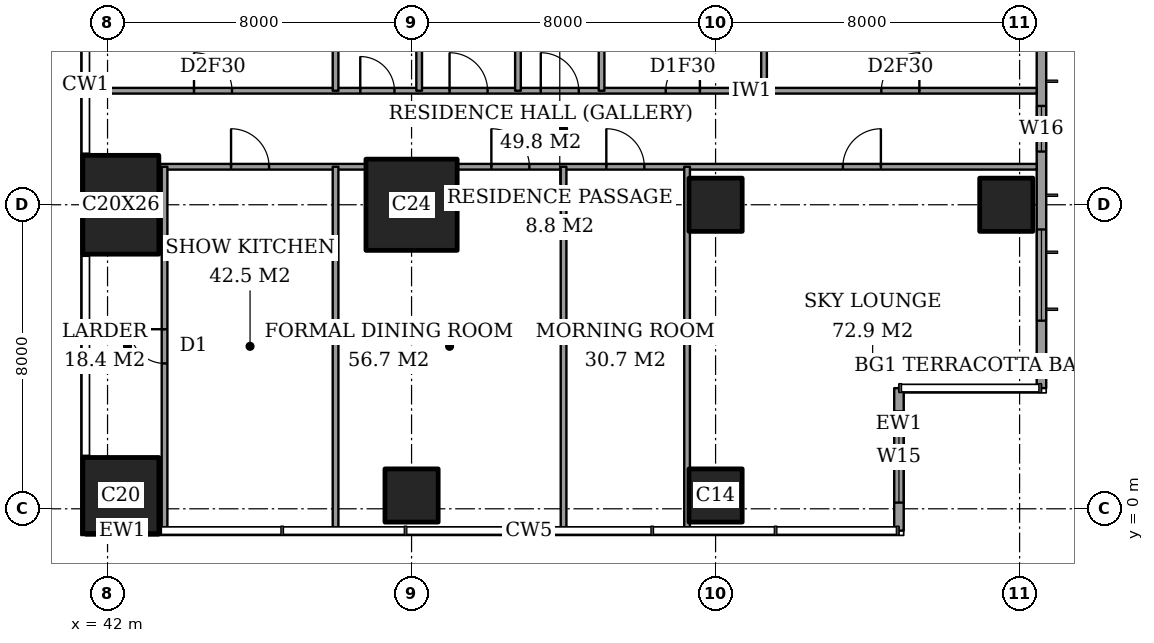
"""IFC4 building model, lengths in metres.
Left out: names, types, materials, properties, quantities, classifications, styles, units other than length and angle.
Written with IfcOpenShell. Run it as: python <this file> out.ifc"""

import sys

from ifc_helpers import new_model, si_unit, direction, frame, frame_2d, origin, origin_2d, place, context, subcontext, project, spatial, rectangle, extrude, element, fill, save


model = new_model("IFC4")
c1 = context("Model", 3, precision=1e-05, world=origin(), true_north=direction((0.0, 1.0)))
c2 = subcontext(c1, "Body", "Model", "MODEL_VIEW")
j1 = project(units=[si_unit("LENGTHUNIT", "METRE"), si_unit("PLANEANGLEUNIT", "RADIAN")], contexts=[c1])
p1 = place(None, origin())
s1 = spatial("IfcSite", under=j1, at=p1, CompositionType="ELEMENT")
p2 = place(p1, origin())
s2 = spatial("IfcBuilding", under=s1, at=p2, CompositionType="ELEMENT")
p3 = place(p2, frame((0.0, 0.0, 282.6)))
s3 = spatial("IfcBuildingStorey", under=s2, at=p3, CompositionType="ELEMENT", Elevation=282.6)
p4 = place(p3, frame((42.35, 0.35, 0.0), z_axis=(0.0, 0.0, 1.0), x_axis=(1.0, 0.0, 0.0)))
e1 = element("IfcColumn", 1, at=p4, inside=s3, PredefinedType="COLUMN", context=c2, shape_type="SweptSolid", body=[
    extrude(rectangle(XDim=2.0, YDim=2.0, at=origin_2d()), origin(), (0.0, 0.0, 1.0), 4.5),
])
p5 = place(p3, frame((42.35, 8.0, 0.0), z_axis=(0.0, 0.0, 1.0), x_axis=(1.0, 0.0, 0.0)))
e2 = element("IfcColumn", 2, at=p5, inside=s3, PredefinedType="COLUMN", context=c2, shape_type="SweptSolid", body=[
    extrude(rectangle(XDim=2.0, YDim=2.6, at=origin_2d()), origin(), (0.0, 0.0, 1.0), 4.5),
])
p6 = place(p3, frame((50.0, 0.35, 0.0), z_axis=(0.0, 0.0, 1.0), x_axis=(1.0, 0.0, 0.0)))
e3 = element("IfcColumn", 3, at=p6, inside=s3, PredefinedType="COLUMN", context=c2, shape_type="SweptSolid", body=[
    extrude(rectangle(XDim=1.4, YDim=1.4, at=origin_2d()), origin(), (0.0, 0.0, 1.0), 4.5),
])
p7 = place(p3, frame((50.0, 8.0, 0.0), z_axis=(0.0, 0.0, 1.0), x_axis=(1.0, 0.0, 0.0)))
e4 = element("IfcColumn", 4, at=p7, inside=s3, PredefinedType="COLUMN", context=c2, shape_type="SweptSolid", body=[
    extrude(rectangle(XDim=2.4, YDim=2.4, at=origin_2d()), origin(), (0.0, 0.0, 1.0), 4.5),
])
for number, where, z_axis, x_axis in (
    (5, (58.0, 0.35, 0.0), (0.0, 0.0, 1.0), (1.0, 0.0, 0.0)),
    (6, (58.0, 8.0, 0.0), (0.0, 0.0, 1.0), (1.0, 0.0, 0.0)),
    (7, (65.65, 8.0, 0.0), (0.0, 0.0, 1.0), (1.0, 0.0, 0.0)),
):
    element("IfcColumn", number, at=place(p3, frame(where, z_axis=z_axis, x_axis=x_axis)), inside=s3, PredefinedType="COLUMN", context=c2, shape_type="SweptSolid", body=[
        extrude(rectangle(XDim=1.4, YDim=1.4, at=origin_2d()), origin(), (0.0, 0.0, 1.0), 4.5),
    ])
p8 = place(p3, frame((41.425, -0.575, 0.0), z_axis=(0.0, 0.0, 1.0), x_axis=(1.0, 0.0, 0.0)))
e8 = element("IfcWall", 8, at=p8, inside=s3, PredefinedType="SOLIDWALL", context=c2, shape_type="SweptSolid", body=[
    extrude(rectangle(XDim=1.925, YDim=0.25, at=frame_2d((0.962, 0.0))), origin(), (0.0, 0.0, 1.0), 4.5),
])
p9 = place(p3, frame((62.825, -0.575, 0.0), z_axis=(0.0, 0.0, 1.0), x_axis=(0.0, 1.0, 0.0)))
e9 = element("IfcWall", 9, at=p9, inside=s3, PredefinedType="SOLIDWALL", context=c2, shape_type="SweptSolid", body=[
    extrude(rectangle(XDim=3.75, YDim=0.25, at=frame_2d((1.875, 0.0))), origin(), (0.0, 0.0, 1.0), 4.5),
])
p10 = place(p9, frame((0.738, 0.0, 0.6)))
e10 = element("IfcOpeningElement", 10, at=p10, cuts=e9, PredefinedType="OPENING", context=c2, shape_type="SweptSolid", body=[
    extrude(rectangle(XDim=2.4, YDim=2.8, at=frame_2d((1.2, 1.4))), frame((0.0, 0.135, 0.0), z_axis=(0.0, -1.0, 0.0), x_axis=(1.0, 0.0, 0.0)), (0.0, 0.0, 1.0), 0.27),
])
p11 = place(p3, frame((66.575, 3.175, 0.0), z_axis=(0.0, 0.0, 1.0), x_axis=(0.0, 1.0, 0.0)))
e11 = element("IfcWall", 11, at=p11, inside=s3, PredefinedType="SOLIDWALL", context=c2, shape_type="SweptSolid", body=[
    extrude(rectangle(XDim=41.65, YDim=0.25, at=frame_2d((20.825, 0.0))), origin(), (0.0, 0.0, 1.0), 4.5),
])
p12 = place(p11, frame((1.775, 0.0, 0.6)))
e12 = element("IfcOpeningElement", 12, at=p12, cuts=e11, PredefinedType="OPENING", context=c2, shape_type="SweptSolid", body=[
    extrude(rectangle(XDim=2.4, YDim=2.8, at=frame_2d((1.2, 1.4))), frame((0.0, 0.135, 0.0), z_axis=(0.0, -1.0, 0.0), x_axis=(1.0, 0.0, 0.0)), (0.0, 0.0, 1.0), 0.27),
])
p13 = place(p11, frame((6.225, 0.0, 0.6)))
e13 = element("IfcOpeningElement", 13, at=p13, cuts=e11, PredefinedType="OPENING", context=c2, shape_type="SweptSolid", body=[
    extrude(rectangle(XDim=1.2, YDim=2.8, at=frame_2d((0.6, 1.4))), frame((0.0, 0.135, 0.0), z_axis=(0.0, -1.0, 0.0), x_axis=(1.0, 0.0, 0.0)), (0.0, 0.0, 1.0), 0.27),
])
p14 = place(p11, frame((9.625, 0.0, 0.6)))
e14 = element("IfcOpeningElement", 14, at=p14, cuts=e11, PredefinedType="OPENING", context=c2, shape_type="SweptSolid", body=[
    extrude(rectangle(XDim=2.4, YDim=2.8, at=frame_2d((1.2, 1.4))), frame((0.0, 0.135, 0.0), z_axis=(0.0, -1.0, 0.0), x_axis=(1.0, 0.0, 0.0)), (0.0, 0.0, 1.0), 0.27),
])
p15 = place(p11, frame((14.525, 0.0, 0.6)))
e15 = element("IfcOpeningElement", 15, at=p15, cuts=e11, PredefinedType="OPENING", context=c2, shape_type="SweptSolid", body=[
    extrude(rectangle(XDim=2.4, YDim=2.8, at=frame_2d((1.2, 1.4))), frame((0.0, 0.135, 0.0), z_axis=(0.0, -1.0, 0.0), x_axis=(1.0, 0.0, 0.0)), (0.0, 0.0, 1.0), 0.27),
])
p16 = place(p11, frame((17.725, 0.0, 0.6)))
e16 = element("IfcOpeningElement", 16, at=p16, cuts=e11, PredefinedType="OPENING", context=c2, shape_type="SweptSolid", body=[
    extrude(rectangle(XDim=2.4, YDim=2.8, at=frame_2d((1.2, 1.4))), frame((0.0, 0.135, 0.0), z_axis=(0.0, -1.0, 0.0), x_axis=(1.0, 0.0, 0.0)), (0.0, 0.0, 1.0), 0.27),
])
p17 = place(p11, frame((21.525, 0.0, 0.6)))
e17 = element("IfcOpeningElement", 17, at=p17, cuts=e11, PredefinedType="OPENING", context=c2, shape_type="SweptSolid", body=[
    extrude(rectangle(XDim=2.4, YDim=2.8, at=frame_2d((1.2, 1.4))), frame((0.0, 0.135, 0.0), z_axis=(0.0, -1.0, 0.0), x_axis=(1.0, 0.0, 0.0)), (0.0, 0.0, 1.0), 0.27),
])
p18 = place(p11, frame((24.725, 0.0, 0.6)))
e18 = element("IfcOpeningElement", 18, at=p18, cuts=e11, PredefinedType="OPENING", context=c2, shape_type="SweptSolid", body=[
    extrude(rectangle(XDim=2.4, YDim=2.8, at=frame_2d((1.2, 1.4))), frame((0.0, 0.135, 0.0), z_axis=(0.0, -1.0, 0.0), x_axis=(1.0, 0.0, 0.0)), (0.0, 0.0, 1.0), 0.27),
])
p19 = place(p11, frame((29.725, 0.0, 0.6)))
e19 = element("IfcOpeningElement", 19, at=p19, cuts=e11, PredefinedType="OPENING", context=c2, shape_type="SweptSolid", body=[
    extrude(rectangle(XDim=2.4, YDim=2.8, at=frame_2d((1.2, 1.4))), frame((0.0, 0.135, 0.0), z_axis=(0.0, -1.0, 0.0), x_axis=(1.0, 0.0, 0.0)), (0.0, 0.0, 1.0), 0.27),
])
p20 = place(p11, frame((34.325, 0.0, 0.6)))
e20 = element("IfcOpeningElement", 20, at=p20, cuts=e11, PredefinedType="OPENING", context=c2, shape_type="SweptSolid", body=[
    extrude(rectangle(XDim=1.2, YDim=2.8, at=frame_2d((0.6, 1.4))), frame((0.0, 0.135, 0.0), z_axis=(0.0, -1.0, 0.0), x_axis=(1.0, 0.0, 0.0)), (0.0, 0.0, 1.0), 0.27),
])
p21 = place(p11, frame((37.475, 0.0, 0.6)))
e21 = element("IfcOpeningElement", 21, at=p21, cuts=e11, PredefinedType="OPENING", context=c2, shape_type="SweptSolid", body=[
    extrude(rectangle(XDim=2.4, YDim=2.8, at=frame_2d((1.2, 1.4))), frame((0.0, 0.135, 0.0), z_axis=(0.0, -1.0, 0.0), x_axis=(1.0, 0.0, 0.0)), (0.0, 0.0, 1.0), 0.27),
])
p22 = place(p3, frame((43.35, 9.0, 0.0), z_axis=(0.0, 0.0, 1.0), x_axis=(1.0, 0.0, 0.0)))
e22 = element("IfcWall", 22, at=p22, inside=s3, PredefinedType="PARTITIONING", context=c2, shape_type="SweptSolid", body=[
    extrude(rectangle(XDim=5.45, YDim=0.15, at=frame_2d((2.725, 0.0))), origin(), (0.0, 0.0, 1.0), 4.25),
])
p23 = place(p22, frame((1.9, 0.0, 0.0)))
e23 = element("IfcOpeningElement", 23, at=p23, cuts=e22, PredefinedType="OPENING", context=c2, shape_type="SweptSolid", body=[
    extrude(rectangle(XDim=1.0, YDim=2.1, at=frame_2d((0.5, 1.05))), frame((0.0, 0.085, 0.0), z_axis=(0.0, -1.0, 0.0), x_axis=(1.0, 0.0, 0.0)), (0.0, 0.0, 1.0), 0.17),
])
p24 = place(p3, frame((51.2, 9.0, 0.0), z_axis=(0.0, 0.0, 1.0), x_axis=(1.0, 0.0, 0.0)))
e24 = element("IfcWall", 24, at=p24, inside=s3, PredefinedType="PARTITIONING", context=c2, shape_type="SweptSolid", body=[
    extrude(rectangle(XDim=15.25, YDim=0.15, at=frame_2d((7.625, 0.0))), origin(), (0.0, 0.0, 1.0), 4.25),
])
p25 = place(p24, frame((10.15, 0.0, 0.0)))
e25 = element("IfcOpeningElement", 25, at=p25, cuts=e24, PredefinedType="OPENING", context=c2, shape_type="SweptSolid", body=[
    extrude(rectangle(XDim=1.0, YDim=2.1, at=frame_2d((0.5, 1.05))), frame((0.0, 0.085, 0.0), z_axis=(0.0, -1.0, 0.0), x_axis=(1.0, 0.0, 0.0)), (0.0, 0.0, 1.0), 0.17),
])
p26 = place(p24, frame((3.925, 0.0, 0.0)))
e26 = element("IfcOpeningElement", 26, at=p26, cuts=e24, PredefinedType="OPENING", context=c2, shape_type="SweptSolid", body=[
    extrude(rectangle(XDim=1.0, YDim=2.1, at=frame_2d((0.5, 1.05))), frame((0.0, 0.085, 0.0), z_axis=(0.0, -1.0, 0.0), x_axis=(1.0, 0.0, 0.0)), (0.0, 0.0, 1.0), 0.17),
])
p27 = place(p24, frame((0.9, 0.0, 0.0)))
e27 = element("IfcOpeningElement", 27, at=p27, cuts=e24, PredefinedType="OPENING", context=c2, shape_type="SweptSolid", body=[
    extrude(rectangle(XDim=1.0, YDim=2.1, at=frame_2d((0.5, 1.05))), frame((0.0, 0.085, 0.0), z_axis=(0.0, -1.0, 0.0), x_axis=(1.0, 0.0, 0.0)), (0.0, 0.0, 1.0), 0.17),
])
p28 = place(p3, frame((41.439, 11.0, 0.0), z_axis=(0.0, 0.0, 1.0), x_axis=(1.0, 0.0, 0.0)))
e28 = element("IfcWall", 28, at=p28, inside=s3, PredefinedType="PARTITIONING", context=c2, shape_type="SweptSolid", body=[
    extrude(rectangle(XDim=25.011, YDim=0.15, at=frame_2d((12.505, 0.0))), origin(), (0.0, 0.0, 1.0), 4.25),
])
p29 = place(p28, frame((11.961, 0.0, 0.0)))
e29 = element("IfcOpeningElement", 29, at=p29, cuts=e28, PredefinedType="OPENING", context=c2, shape_type="SweptSolid", body=[
    extrude(rectangle(XDim=1.0, YDim=2.1, at=frame_2d((0.5, 1.05))), frame((0.0, 0.085, 0.0), z_axis=(0.0, -1.0, 0.0), x_axis=(1.0, 0.0, 0.0)), (0.0, 0.0, 1.0), 0.17),
])
p30 = place(p28, frame((20.924, 0.0, 0.0)))
e30 = element("IfcOpeningElement", 30, at=p30, cuts=e28, PredefinedType="OPENING", context=c2, shape_type="SweptSolid", body=[
    extrude(rectangle(XDim=1.0, YDim=2.1, at=frame_2d((0.5, 1.05))), frame((0.0, 0.085, 0.0), z_axis=(0.0, -1.0, 0.0), x_axis=(1.0, 0.0, 0.0)), (0.0, 0.0, 1.0), 0.17),
])
p31 = place(p28, frame((15.249, 0.0, 0.0)))
e31 = element("IfcOpeningElement", 31, at=p31, cuts=e28, PredefinedType="OPENING", context=c2, shape_type="SweptSolid", body=[
    extrude(rectangle(XDim=0.9, YDim=2.1, at=frame_2d((0.45, 1.05))), frame((0.0, 0.085, 0.0), z_axis=(0.0, -1.0, 0.0), x_axis=(1.0, 0.0, 0.0)), (0.0, 0.0, 1.0), 0.17),
])
p32 = place(p28, frame((9.561, 0.0, 0.0)))
e32 = element("IfcOpeningElement", 32, at=p32, cuts=e28, PredefinedType="OPENING", context=c2, shape_type="SweptSolid", body=[
    extrude(rectangle(XDim=1.0, YDim=2.1, at=frame_2d((0.5, 1.05))), frame((0.0, 0.085, 0.0), z_axis=(0.0, -1.0, 0.0), x_axis=(1.0, 0.0, 0.0)), (0.0, 0.0, 1.0), 0.17),
])
p33 = place(p28, frame((7.211, 0.0, 0.0)))
e33 = element("IfcOpeningElement", 33, at=p33, cuts=e28, PredefinedType="OPENING", context=c2, shape_type="SweptSolid", body=[
    extrude(rectangle(XDim=0.9, YDim=2.1, at=frame_2d((0.45, 1.05))), frame((0.0, 0.085, 0.0), z_axis=(0.0, -1.0, 0.0), x_axis=(1.0, 0.0, 0.0)), (0.0, 0.0, 1.0), 0.17),
])
p34 = place(p28, frame((2.836, 0.0, 0.0)))
e34 = element("IfcOpeningElement", 34, at=p34, cuts=e28, PredefinedType="OPENING", context=c2, shape_type="SweptSolid", body=[
    extrude(rectangle(XDim=1.0, YDim=2.1, at=frame_2d((0.5, 1.05))), frame((0.0, 0.085, 0.0), z_axis=(0.0, -1.0, 0.0), x_axis=(1.0, 0.0, 0.0)), (0.0, 0.0, 1.0), 0.17),
])
p35 = place(p3, frame((43.5, -0.561, 0.0), z_axis=(0.0, 0.0, 1.0), x_axis=(0.0, 1.0, 0.0)))
e35 = element("IfcWall", 35, at=p35, inside=s3, PredefinedType="PARTITIONING", context=c2, shape_type="SweptSolid", body=[
    extrude(rectangle(XDim=9.561, YDim=0.15, at=frame_2d((4.781, 0.0))), origin(), (0.0, 0.0, 1.0), 4.25),
])
p36 = place(p35, frame((4.386, 0.0, 0.0)))
e36 = element("IfcOpeningElement", 36, at=p36, cuts=e35, PredefinedType="OPENING", context=c2, shape_type="SweptSolid", body=[
    extrude(rectangle(XDim=0.9, YDim=2.1, at=frame_2d((0.45, 1.05))), frame((0.0, 0.085, 0.0), z_axis=(0.0, -1.0, 0.0), x_axis=(1.0, 0.0, 0.0)), (0.0, 0.0, 1.0), 0.17),
])
p37 = place(p3, frame((48.0, -0.561, 0.0), z_axis=(0.0, 0.0, 1.0), x_axis=(0.0, 1.0, 0.0)))
e37 = element("IfcWall", 37, at=p37, inside=s3, PredefinedType="PARTITIONING", context=c2, shape_type="SweptSolid", body=[
    extrude(rectangle(XDim=9.561, YDim=0.15, at=frame_2d((4.781, 0.0))), origin(), (0.0, 0.0, 1.0), 4.25),
])
p38 = place(p3, frame((48.0, 11.0, 0.0), z_axis=(0.0, 0.0, 1.0), x_axis=(0.0, 1.0, 0.0)))
e38 = element("IfcWall", 38, at=p38, inside=s3, PredefinedType="PARTITIONING", context=c2, shape_type="SweptSolid", body=[
    extrude(rectangle(XDim=13.0, YDim=0.15, at=frame_2d((6.5, 0.0))), origin(), (0.0, 0.0, 1.0), 4.25),
])
p39 = place(p38, frame((10.4, 0.0, 0.0)))
e39 = element("IfcOpeningElement", 39, at=p39, cuts=e38, PredefinedType="OPENING", context=c2, shape_type="SweptSolid", body=[
    extrude(rectangle(XDim=1.2, YDim=2.4, at=frame_2d((0.6, 1.2))), frame((0.0, 0.085, 0.0), z_axis=(0.0, -1.0, 0.0), x_axis=(1.0, 0.0, 0.0)), (0.0, 0.0, 1.0), 0.17),
])
p40 = place(p38, frame((6.8, 0.0, 0.0)))
e40 = element("IfcOpeningElement", 40, at=p40, cuts=e38, PredefinedType="OPENING", context=c2, shape_type="SweptSolid", body=[
    extrude(rectangle(XDim=0.9, YDim=2.1, at=frame_2d((0.45, 1.05))), frame((0.0, 0.085, 0.0), z_axis=(0.0, -1.0, 0.0), x_axis=(1.0, 0.0, 0.0)), (0.0, 0.0, 1.0), 0.17),
])
p41 = place(p3, frame((50.2, 11.0, 0.0), z_axis=(0.0, 0.0, 1.0), x_axis=(0.0, 1.0, 0.0)))
e41 = element("IfcWall", 41, at=p41, inside=s3, PredefinedType="PARTITIONING", context=c2, shape_type="SweptSolid", body=[
    extrude(rectangle(XDim=3.8, YDim=0.15, at=frame_2d((1.9, 0.0))), origin(), (0.0, 0.0, 1.0), 4.25),
])
p42 = place(p3, frame((52.8, 11.0, 0.0), z_axis=(0.0, 0.0, 1.0), x_axis=(0.0, 1.0, 0.0)))
e42 = element("IfcWall", 42, at=p42, inside=s3, PredefinedType="PARTITIONING", context=c2, shape_type="SweptSolid", body=[
    extrude(rectangle(XDim=4.0, YDim=0.15, at=frame_2d((2.0, 0.0))), origin(), (0.0, 0.0, 1.0), 4.25),
])
p43 = place(p3, frame((54.0, -0.561, 0.0), z_axis=(0.0, 0.0, 1.0), x_axis=(0.0, 1.0, 0.0)))
e43 = element("IfcWall", 43, at=p43, inside=s3, PredefinedType="PARTITIONING", context=c2, shape_type="SweptSolid", body=[
    extrude(rectangle(XDim=9.561, YDim=0.15, at=frame_2d((4.781, 0.0))), origin(), (0.0, 0.0, 1.0), 4.25),
])
p44 = place(p3, frame((55.0, 11.0, 0.0), z_axis=(0.0, 0.0, 1.0), x_axis=(0.0, 1.0, 0.0)))
e44 = element("IfcWall", 44, at=p44, inside=s3, PredefinedType="PARTITIONING", context=c2, shape_type="SweptSolid", body=[
    extrude(rectangle(XDim=10.6, YDim=0.15, at=frame_2d((5.3, 0.0))), origin(), (0.0, 0.0, 1.0), 4.25),
])
p45 = place(p44, frame((6.8, 0.0, 0.0)))
e45 = element("IfcOpeningElement", 45, at=p45, cuts=e44, PredefinedType="OPENING", context=c2, shape_type="SweptSolid", body=[
    extrude(rectangle(XDim=1.0, YDim=2.1, at=frame_2d((0.5, 1.05))), frame((0.0, 0.085, 0.0), z_axis=(0.0, -1.0, 0.0), x_axis=(1.0, 0.0, 0.0)), (0.0, 0.0, 1.0), 0.17),
])
p46 = place(p3, frame((57.25, -0.561, 0.0), z_axis=(0.0, 0.0, 1.0), x_axis=(0.0, 1.0, 0.0)))
e46 = element("IfcWall", 46, at=p46, inside=s3, PredefinedType="PARTITIONING", context=c2, shape_type="SweptSolid", body=[
    extrude(rectangle(XDim=9.561, YDim=0.15, at=frame_2d((4.781, 0.0))), origin(), (0.0, 0.0, 1.0), 4.25),
])
p47 = place(p3, frame((59.275, 11.0, 0.0), z_axis=(0.0, 0.0, 1.0), x_axis=(0.0, 1.0, 0.0)))
e47 = element("IfcWall", 47, at=p47, inside=s3, PredefinedType="PARTITIONING", context=c2, shape_type="SweptSolid", body=[
    extrude(rectangle(XDim=3.8, YDim=0.15, at=frame_2d((1.9, 0.0))), origin(), (0.0, 0.0, 1.0), 4.25),
])
p48 = place(p10, origin())
e48 = element("IfcWindow", 48, at=p48, inside=s3, PartitioningType="SINGLE_PANEL", PredefinedType="WINDOW", context=c2, shape_type="SweptSolid", body=[
    extrude(rectangle(XDim=2.4, YDim=2.8, at=frame_2d((1.2, 1.4))), frame((0.0, 0.03, 0.0), z_axis=(0.0, -1.0, 0.0), x_axis=(1.0, 0.0, 0.0)), (0.0, 0.0, 1.0), 0.06),
])
fill(e10, e48)
p49 = place(p12, origin())
e49 = element("IfcWindow", 49, at=p49, inside=s3, PartitioningType="SINGLE_PANEL", PredefinedType="WINDOW", context=c2, shape_type="SweptSolid", body=[
    extrude(rectangle(XDim=2.4, YDim=2.8, at=frame_2d((1.2, 1.4))), frame((0.0, 0.03, 0.0), z_axis=(0.0, -1.0, 0.0), x_axis=(1.0, 0.0, 0.0)), (0.0, 0.0, 1.0), 0.06),
])
fill(e12, e49)
p50 = place(p13, origin())
e50 = element("IfcWindow", 50, at=p50, inside=s3, PartitioningType="SINGLE_PANEL", PredefinedType="WINDOW", context=c2, shape_type="SweptSolid", body=[
    extrude(rectangle(XDim=1.2, YDim=2.8, at=frame_2d((0.6, 1.4))), frame((0.0, 0.03, 0.0), z_axis=(0.0, -1.0, 0.0), x_axis=(1.0, 0.0, 0.0)), (0.0, 0.0, 1.0), 0.06),
])
fill(e13, e50)
p51 = place(p25, origin())
e51 = element("IfcDoor", 51, at=p51, inside=s3, OperationType="SINGLE_SWING_LEFT", PredefinedType="DOOR", context=c2, shape_type="SweptSolid", body=[
    extrude(rectangle(XDim=1.0, YDim=2.1, at=frame_2d((0.5, 1.05))), frame((0.0, 0.025, 0.0), z_axis=(0.0, -1.0, 0.0), x_axis=(1.0, 0.0, 0.0)), (0.0, 0.0, 1.0), 0.05),
])
fill(e25, e51)
p52 = place(p26, origin())
e52 = element("IfcDoor", 52, at=p52, inside=s3, OperationType="SINGLE_SWING_RIGHT", PredefinedType="DOOR", context=c2, shape_type="SweptSolid", body=[
    extrude(rectangle(XDim=1.0, YDim=2.1, at=frame_2d((0.5, 1.05))), frame((0.0, 0.025, 0.0), z_axis=(0.0, -1.0, 0.0), x_axis=(1.0, 0.0, 0.0)), (0.0, 0.0, 1.0), 0.05),
])
fill(e26, e52)
p53 = place(p27, origin())
e53 = element("IfcDoor", 53, at=p53, inside=s3, OperationType="SINGLE_SWING_RIGHT", PredefinedType="DOOR", context=c2, shape_type="SweptSolid", body=[
    extrude(rectangle(XDim=1.0, YDim=2.1, at=frame_2d((0.5, 1.05))), frame((0.0, 0.025, 0.0), z_axis=(0.0, -1.0, 0.0), x_axis=(1.0, 0.0, 0.0)), (0.0, 0.0, 1.0), 0.05),
])
fill(e27, e53)
p54 = place(p23, origin())
e54 = element("IfcDoor", 54, at=p54, inside=s3, OperationType="SINGLE_SWING_RIGHT", PredefinedType="DOOR", context=c2, shape_type="SweptSolid", body=[
    extrude(rectangle(XDim=1.0, YDim=2.1, at=frame_2d((0.5, 1.05))), frame((0.0, 0.025, 0.0), z_axis=(0.0, -1.0, 0.0), x_axis=(1.0, 0.0, 0.0)), (0.0, 0.0, 1.0), 0.05),
])
fill(e23, e54)
p55 = place(p36, origin())
e55 = element("IfcDoor", 55, at=p55, inside=s3, OperationType="SINGLE_SWING_LEFT", PredefinedType="DOOR", context=c2, shape_type="SweptSolid", body=[
    extrude(rectangle(XDim=0.9, YDim=2.1, at=frame_2d((0.45, 1.05))), frame((0.0, 0.025, 0.0), z_axis=(0.0, -1.0, 0.0), x_axis=(1.0, 0.0, 0.0)), (0.0, 0.0, 1.0), 0.05),
])
fill(e36, e55)
p56 = place(p29, origin())
e56 = element("IfcDoor", 56, at=p56, inside=s3, OperationType="SINGLE_SWING_RIGHT", PredefinedType="DOOR", context=c2, shape_type="SweptSolid", body=[
    extrude(rectangle(XDim=1.0, YDim=2.1, at=frame_2d((0.5, 1.05))), frame((0.0, 0.025, 0.0), z_axis=(0.0, -1.0, 0.0), x_axis=(1.0, 0.0, 0.0)), (0.0, 0.0, 1.0), 0.05),
])
fill(e29, e56)
p57 = place(p30, origin())
e57 = element("IfcDoor", 57, at=p57, inside=s3, OperationType="SINGLE_SWING_LEFT", PredefinedType="DOOR", context=c2, shape_type="SweptSolid", body=[
    extrude(rectangle(XDim=1.0, YDim=2.1, at=frame_2d((0.5, 1.05))), frame((0.0, 0.025, 0.0), z_axis=(0.0, -1.0, 0.0), x_axis=(1.0, 0.0, 0.0)), (0.0, 0.0, 1.0), 0.05),
])
fill(e30, e57)
p58 = place(p31, origin())
e58 = element("IfcDoor", 58, at=p58, inside=s3, OperationType="SINGLE_SWING_LEFT", PredefinedType="DOOR", context=c2, shape_type="SweptSolid", body=[
    extrude(rectangle(XDim=0.9, YDim=2.1, at=frame_2d((0.45, 1.05))), frame((0.0, 0.025, 0.0), z_axis=(0.0, -1.0, 0.0), x_axis=(1.0, 0.0, 0.0)), (0.0, 0.0, 1.0), 0.05),
])
fill(e31, e58)
p59 = place(p32, origin())
e59 = element("IfcDoor", 59, at=p59, inside=s3, OperationType="SINGLE_SWING_RIGHT", PredefinedType="DOOR", context=c2, shape_type="SweptSolid", body=[
    extrude(rectangle(XDim=1.0, YDim=2.1, at=frame_2d((0.5, 1.05))), frame((0.0, 0.025, 0.0), z_axis=(0.0, -1.0, 0.0), x_axis=(1.0, 0.0, 0.0)), (0.0, 0.0, 1.0), 0.05),
])
fill(e32, e59)
p60 = place(p33, origin())
e60 = element("IfcDoor", 60, at=p60, inside=s3, OperationType="SINGLE_SWING_RIGHT", PredefinedType="DOOR", context=c2, shape_type="SweptSolid", body=[
    extrude(rectangle(XDim=0.9, YDim=2.1, at=frame_2d((0.45, 1.05))), frame((0.0, 0.025, 0.0), z_axis=(0.0, -1.0, 0.0), x_axis=(1.0, 0.0, 0.0)), (0.0, 0.0, 1.0), 0.05),
])
fill(e33, e60)
p61 = place(p34, origin())
e61 = element("IfcDoor", 61, at=p61, inside=s3, OperationType="SINGLE_SWING_RIGHT", PredefinedType="DOOR", context=c2, shape_type="SweptSolid", body=[
    extrude(rectangle(XDim=1.0, YDim=2.1, at=frame_2d((0.5, 1.05))), frame((0.0, 0.025, 0.0), z_axis=(0.0, -1.0, 0.0), x_axis=(1.0, 0.0, 0.0)), (0.0, 0.0, 1.0), 0.05),
])
fill(e34, e61)
save(model, sys.argv[1])
